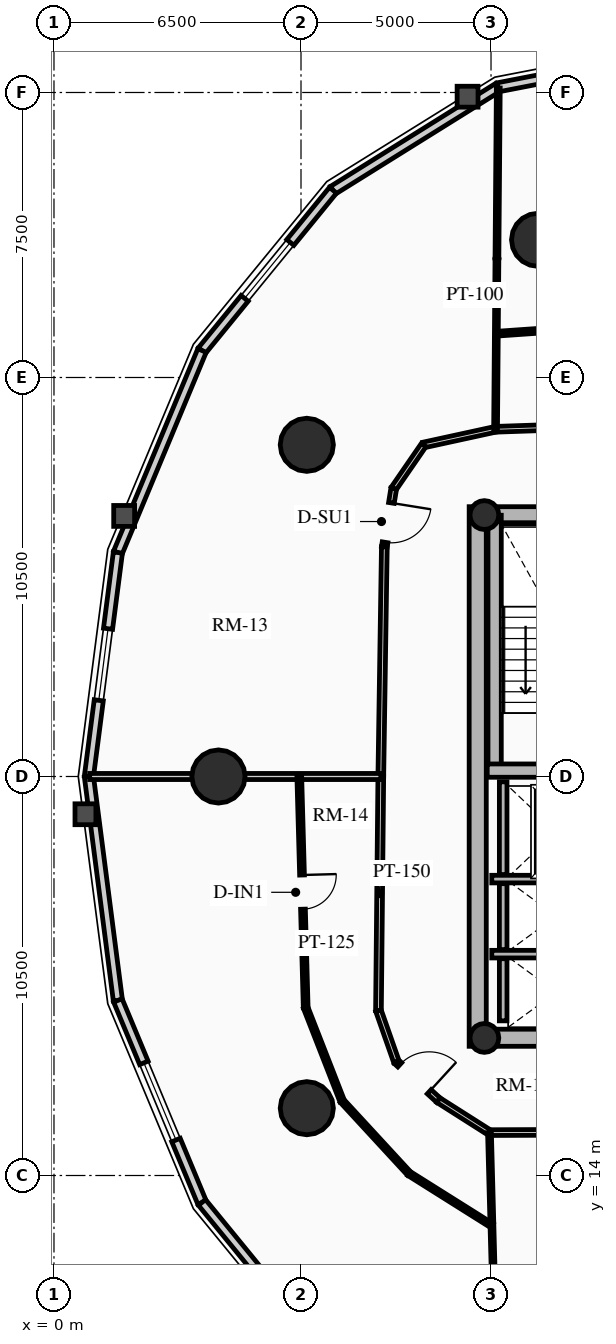
"""IFC4 building model, lengths in metres.
Left out: names, types, materials, properties, quantities, classifications, styles, units other than length and angle.
Written with IfcOpenShell. Run it as: python <this file> out.ifc"""

import sys

from ifc_helpers import new_model, si_unit, direction, frame, frame_2d, origin, origin_2d, place, context, subcontext, project, spatial, rectangle, circle, hollow_circle, extrude, source, transform, mapped, element, fill, save


model = new_model("IFC4")
c1 = context("Model", 3, precision=1e-05, world=origin(), true_north=direction((0.0, 1.0)))
c2 = subcontext(c1, "Body", "Model", "MODEL_VIEW")
j1 = project(units=[si_unit("LENGTHUNIT", "METRE"), si_unit("PLANEANGLEUNIT", "RADIAN")], contexts=[c1])
p1 = place(None, origin())
s1 = spatial("IfcSite", under=j1, at=p1, CompositionType="ELEMENT")
p2 = place(p1, origin())
s2 = spatial("IfcBuilding", under=s1, at=p2, CompositionType="ELEMENT")
p3 = place(p2, frame((0.0, 0.0, 125.44)))
s3 = spatial("IfcBuildingStorey", under=s2, at=p3, CompositionType="ELEMENT", Elevation=125.44)
p4 = place(p3, frame((11.15, 17.4, 0.0), z_axis=(0.0, 0.0, 1.0), x_axis=(0.0, 1.0, 0.0)))
e1 = element("IfcWall", 1, at=p4, inside=s3, PredefinedType="SHEAR", context=c2, shape_type="SweptSolid", body=[
    extrude(rectangle(XDim=14.2, YDim=0.45, at=frame_2d((7.1, 0.0))), origin(), (0.0, 0.0, 1.0), 3.72),
])
p5 = place(p3, frame((11.15, 17.625, 0.0), z_axis=(0.0, 0.0, 1.0), x_axis=(1.0, 0.0, 0.0)))
e2 = element("IfcWall", 2, at=p5, inside=s3, PredefinedType="SHEAR", context=c2, shape_type="SweptSolid", body=[
    extrude(rectangle(XDim=10.7, YDim=0.45, at=frame_2d((5.35, 0.0))), origin(), (0.0, 0.0, 1.0), 3.72),
])
m1 = source(origin(), c2, "Body", "SweptSolid", [
    extrude(rectangle(XDim=1.5, YDim=2.02, at=frame_2d((0.75, 1.01))), frame((0.0, 0.235, 0.0), z_axis=(0.0, -1.0, 0.0), x_axis=(1.0, 0.0, 0.0)), (0.0, 0.0, 1.0), 0.47),
])
p6 = place(p5, frame((5.45, 0.0, 0.0)))
e3 = element("IfcOpeningElement", 3, at=p6, cuts=e2, PredefinedType="OPENING", context=c2, shape_type="MappedRepresentation", body=[
    mapped(m1, transform((0.0, 0.0, 0.0), x_axis=(1.0, 0.0, 0.0), y_axis=(0.0, 1.0, 0.0), z_axis=(0.0, 0.0, 1.0), scale=1.0)),
])
p7 = place(p3, frame((11.15, 31.375, 0.0), z_axis=(0.0, 0.0, 1.0), x_axis=(1.0, 0.0, 0.0)))
e4 = element("IfcWall", 4, at=p7, inside=s3, PredefinedType="SHEAR", context=c2, shape_type="SweptSolid", body=[
    extrude(rectangle(XDim=10.7, YDim=0.45, at=frame_2d((5.35, 0.0))), origin(), (0.0, 0.0, 1.0), 3.72),
])
p8 = place(p7, frame((4.6, 0.0, 0.0)))
e5 = element("IfcOpeningElement", 5, at=p8, cuts=e4, PredefinedType="OPENING", context=c2, shape_type="MappedRepresentation", body=[
    mapped(m1, transform((0.0, 0.0, 0.0), x_axis=(1.0, 0.0, 0.0), y_axis=(0.0, 1.0, 0.0), z_axis=(0.0, 0.0, 1.0), scale=1.0)),
])
p9 = place(p3, frame((11.595, 24.655, 0.0), z_axis=(0.0, 0.0, 1.0), x_axis=(0.0, 1.0, 0.0)))
e6 = element("IfcWall", 6, at=p9, inside=s3, PredefinedType="SHEAR", context=c2, shape_type="SweptSolid", body=[
    extrude(rectangle(XDim=6.72, YDim=0.35, at=frame_2d((3.36, 0.0))), origin(), (0.0, 0.0, 1.0), 3.72),
])
p10 = place(p3, frame((11.4, 24.655, 0.0), z_axis=(0.0, 0.0, 1.0), x_axis=(1.0, 0.0, 0.0)))
e7 = element("IfcWall", 7, at=p10, inside=s3, PredefinedType="SHEAR", context=c2, shape_type="SweptSolid", body=[
    extrude(rectangle(XDim=3.285, YDim=0.35, at=frame_2d((1.643, 0.0))), origin(), (0.0, 0.0, 1.0), 3.72),
])
for number, where, z_axis, x_axis in (
    (8, (11.325, 17.62, 0.0), (0.0, 0.0, 1.0), (1.0, 0.0, 0.0)),
    (9, (11.325, 31.38, 0.0), (0.0, 0.0, 1.0), (1.0, 0.0, 0.0)),
):
    element("IfcColumn", number, at=place(p3, frame(where, z_axis=z_axis, x_axis=x_axis)), inside=s3, PredefinedType="COLUMN", context=c2, shape_type="SweptSolid", body=[
        extrude(hollow_circle(Radius=0.38, WallThickness=0.032, at=origin_2d()), origin(), (0.0, 0.0, 1.0), 3.72),
    ])
for number, where, z_axis, x_axis in (
    (10, (12.739, 38.623, 0.0), (0.0, 0.0, 1.0), (1.0, 0.0, 0.0)),
    (11, (6.653, 33.229, 0.0), (0.0, 0.0, 1.0), (1.0, 0.0, 0.0)),
    (12, (4.328, 24.5, 0.0), (0.0, 0.0, 1.0), (1.0, 0.0, 0.0)),
    (13, (6.653, 15.771, 0.0), (0.0, 0.0, 1.0), (1.0, 0.0, 0.0)),
):
    element("IfcColumn", number, at=place(p3, frame(where, z_axis=z_axis, x_axis=x_axis)), inside=s3, PredefinedType="USERDEFINED", context=c2, shape_type="SweptSolid", body=[
        extrude(circle(Radius=0.7, at=origin_2d()), origin(), (0.0, 0.0, 1.0), 3.72),
    ])
p11 = place(p3, frame((11.685, 42.637, 0.0), z_axis=(0.0, 0.0, 1.0), x_axis=(0.981723785992, 0.190311344954, 0.0)))
e14 = element("IfcWall", 14, at=p11, inside=s3, PredefinedType="SOLIDWALL", context=c2, shape_type="SweptSolid", body=[
    extrude(rectangle(XDim=4.904, YDim=0.24, at=frame_2d((2.452, 0.0))), origin(), (0.0, 0.0, 1.0), 2.949),
])
m2 = source(origin(), c2, "Body", "SweptSolid", [
    extrude(rectangle(XDim=2.2, YDim=1.35, at=frame_2d((1.1, 0.675))), frame((0.0, 0.13, 0.0), z_axis=(0.0, -1.0, 0.0), x_axis=(1.0, 0.0, 0.0)), (0.0, 0.0, 1.0), 0.26),
])
p12 = place(p11, frame((1.352, 0.0, 0.65)))
e15 = element("IfcOpeningElement", 15, at=p12, cuts=e14, PredefinedType="OPENING", context=c2, shape_type="MappedRepresentation", body=[
    mapped(m2, transform((0.0, 0.0, 0.0), x_axis=(1.0, 0.0, 0.0), y_axis=(0.0, 1.0, 0.0), z_axis=(0.0, 0.0, 1.0), scale=1.0)),
])
p13 = place(p3, frame((7.342, 39.928, 0.0), z_axis=(0.0, 0.0, 1.0), x_axis=(0.848520380187, 0.529162701263, 0.0)))
e16 = element("IfcWall", 16, at=p13, inside=s3, PredefinedType="SOLIDWALL", context=c2, shape_type="SweptSolid", body=[
    extrude(rectangle(XDim=5.119, YDim=0.24, at=frame_2d((2.56, 0.0))), origin(), (0.0, 0.0, 1.0), 2.949),
])
p14 = place(p3, frame((3.895, 35.709, 0.0), z_axis=(0.0, 0.0, 1.0), x_axis=(0.632700781152, 0.77439635945, 0.0)))
e17 = element("IfcWall", 17, at=p14, inside=s3, PredefinedType="SOLIDWALL", context=c2, shape_type="SweptSolid", body=[
    extrude(rectangle(XDim=5.448, YDim=0.24, at=frame_2d((2.724, 0.0))), origin(), (0.0, 0.0, 1.0), 2.949),
])
m3 = source(origin(), c2, "Body", "SweptSolid", [
    extrude(rectangle(XDim=1.9, YDim=1.35, at=frame_2d((0.95, 0.675))), frame((0.0, 0.13, 0.0), z_axis=(0.0, -1.0, 0.0), x_axis=(1.0, 0.0, 0.0)), (0.0, 0.0, 1.0), 0.26),
])
p15 = place(p14, frame((1.774, 0.0, 0.65)))
e18 = element("IfcOpeningElement", 18, at=p15, cuts=e17, PredefinedType="OPENING", context=c2, shape_type="MappedRepresentation", body=[
    mapped(m3, transform((0.0, 0.0, 0.0), x_axis=(1.0, 0.0, 0.0), y_axis=(0.0, 1.0, 0.0), z_axis=(0.0, 0.0, 1.0), scale=1.0)),
])
p16 = place(p3, frame((1.682, 30.393, 0.0), z_axis=(0.0, 0.0, 1.0), x_axis=(0.384344417632, 0.923189779317, 0.0)))
e19 = element("IfcWall", 19, at=p16, inside=s3, PredefinedType="SOLIDWALL", context=c2, shape_type="SweptSolid", body=[
    extrude(rectangle(XDim=5.758, YDim=0.24, at=frame_2d((2.879, 0.0))), origin(), (0.0, 0.0, 1.0), 2.949),
])
p17 = place(p3, frame((0.919, 24.5, 0.0), z_axis=(0.0, 0.0, 1.0), x_axis=(0.128351991996, 0.991728675672, 0.0)))
e20 = element("IfcWall", 20, at=p17, inside=s3, PredefinedType="SOLIDWALL", context=c2, shape_type="SweptSolid", body=[
    extrude(rectangle(XDim=5.942, YDim=0.24, at=frame_2d((2.971, 0.0))), origin(), (0.0, 0.0, 1.0), 2.949),
])
p18 = place(p17, frame((2.021, 0.0, 0.65)))
e21 = element("IfcOpeningElement", 21, at=p18, cuts=e20, PredefinedType="OPENING", context=c2, shape_type="MappedRepresentation", body=[
    mapped(m3, transform((0.0, 0.0, 0.0), x_axis=(1.0, 0.0, 0.0), y_axis=(0.0, 1.0, 0.0), z_axis=(0.0, 0.0, 1.0), scale=1.0)),
])
p19 = place(p3, frame((1.682, 18.607, 0.0), z_axis=(0.0, 0.0, 1.0), x_axis=(-0.128351991996, 0.991728675672, 0.0)))
e22 = element("IfcWall", 22, at=p19, inside=s3, PredefinedType="SOLIDWALL", context=c2, shape_type="SweptSolid", body=[
    extrude(rectangle(XDim=5.942, YDim=0.24, at=frame_2d((2.971, 0.0))), origin(), (0.0, 0.0, 1.0), 2.949),
])
p20 = place(p3, frame((3.895, 13.291, 0.0), z_axis=(0.0, 0.0, 1.0), x_axis=(-0.384344417632, 0.923189779317, 0.0)))
e23 = element("IfcWall", 23, at=p20, inside=s3, PredefinedType="SOLIDWALL", context=c2, shape_type="SweptSolid", body=[
    extrude(rectangle(XDim=5.758, YDim=0.24, at=frame_2d((2.879, 0.0))), origin(), (0.0, 0.0, 1.0), 2.949),
])
p21 = place(p20, frame((1.779, 0.0, 0.65)))
e24 = element("IfcOpeningElement", 24, at=p21, cuts=e23, PredefinedType="OPENING", context=c2, shape_type="MappedRepresentation", body=[
    mapped(m2, transform((0.0, 0.0, 0.0), x_axis=(1.0, 0.0, 0.0), y_axis=(0.0, 1.0, 0.0), z_axis=(0.0, 0.0, 1.0), scale=1.0)),
])
p22 = place(p3, frame((7.342, 9.072, 0.0), z_axis=(0.0, 0.0, 1.0), x_axis=(-0.632700781152, 0.77439635945, 0.0)))
e25 = element("IfcWall", 25, at=p22, inside=s3, PredefinedType="SOLIDWALL", context=c2, shape_type="SweptSolid", body=[
    extrude(rectangle(XDim=5.448, YDim=0.24, at=frame_2d((2.724, 0.0))), origin(), (0.0, 0.0, 1.0), 2.949),
])
p23 = place(p3, frame((11.52, 21.8, 0.0), z_axis=(0.0, 0.0, 1.0), x_axis=(1.0, 0.0, 0.0)))
e26 = element("IfcWall", 26, at=p23, inside=s3, PredefinedType="SHEAR", context=c2, shape_type="SweptSolid", body=[
    extrude(rectangle(XDim=2.97, YDim=0.2, at=frame_2d((1.485, 0.0))), origin(), (0.0, 0.0, 1.0), 3.72),
])
p24 = place(p3, frame((11.82, 21.92, 0.0), z_axis=(0.0, 0.0, 1.0), x_axis=(0.0, 1.0, 0.0)))
e27 = element("IfcWall", 27, at=p24, inside=s3, PredefinedType="SHEAR", context=c2, shape_type="SweptSolid", body=[
    extrude(rectangle(XDim=2.44, YDim=0.2, at=frame_2d((1.22, 0.0))), origin(), (0.0, 0.0, 1.0), 3.72),
])
p25 = place(p3, frame((11.52, 19.825, 0.0), z_axis=(0.0, 0.0, 1.0), x_axis=(1.0, 0.0, 0.0)))
e28 = element("IfcWall", 28, at=p25, inside=s3, PredefinedType="SHEAR", context=c2, shape_type="SweptSolid", body=[
    extrude(rectangle(XDim=2.97, YDim=0.2, at=frame_2d((1.485, 0.0))), origin(), (0.0, 0.0, 1.0), 3.72),
])
p26 = place(p3, frame((11.82, 19.945, 0.0), z_axis=(0.0, 0.0, 1.0), x_axis=(0.0, 1.0, 0.0)))
e29 = element("IfcWall", 29, at=p26, inside=s3, PredefinedType="SHEAR", context=c2, shape_type="SweptSolid", body=[
    extrude(rectangle(XDim=1.735, YDim=0.2, at=frame_2d((0.867, 0.0))), origin(), (0.0, 0.0, 1.0), 3.72),
])
p27 = place(p3, frame((11.82, 18.07, 0.0), z_axis=(0.0, 0.0, 1.0), x_axis=(0.0, 1.0, 0.0)))
e30 = element("IfcWall", 30, at=p27, inside=s3, PredefinedType="SHEAR", context=c2, shape_type="SweptSolid", body=[
    extrude(rectangle(XDim=1.635, YDim=0.2, at=frame_2d((0.817, 0.0))), origin(), (0.0, 0.0, 1.0), 3.72),
])
p28 = place(p3, frame((18.143, 33.86, 0.0), z_axis=(0.0, 0.0, 1.0), x_axis=(-0.999419208319, -0.034077060363, 0.0)))
e31 = element("IfcWall", 31, at=p28, inside=s3, PredefinedType="PARTITIONING", context=c2, shape_type="SweptSolid", body=[
    extrude(rectangle(XDim=6.527, YDim=0.15, at=frame_2d((3.263, 0.0))), origin(), (0.0, 0.0, 1.0), 2.995),
])
p29 = place(p3, frame((11.62, 33.637, 0.0), z_axis=(0.0, 0.0, 1.0), x_axis=(-0.97702579435, -0.213121085711, 0.0)))
e32 = element("IfcWall", 32, at=p29, inside=s3, PredefinedType="PARTITIONING", context=c2, shape_type="SweptSolid", body=[
    extrude(rectangle(XDim=1.935, YDim=0.15, at=frame_2d((0.967, 0.0))), origin(), (0.0, 0.0, 1.0), 2.995),
])
p30 = place(p3, frame((9.729, 33.225, 0.0), z_axis=(0.0, 0.0, 1.0), x_axis=(-0.567183649484, -0.82359134755, 0.0)))
e33 = element("IfcWall", 33, at=p30, inside=s3, PredefinedType="PARTITIONING", context=c2, shape_type="SweptSolid", body=[
    extrude(rectangle(XDim=1.392, YDim=0.15, at=frame_2d((0.696, 0.0))), origin(), (0.0, 0.0, 1.0), 2.995),
])
p31 = place(p3, frame((8.94, 32.078, 0.0), z_axis=(0.0, 0.0, 1.0), x_axis=(-0.159148467753, -0.98725466077, 0.0)))
e34 = element("IfcWall", 34, at=p31, inside=s3, PredefinedType="PARTITIONING", context=c2, shape_type="SweptSolid", body=[
    extrude(rectangle(XDim=1.554, YDim=0.15, at=frame_2d((0.777, 0.0))), origin(), (0.0, 0.0, 1.0), 2.995),
])
m4 = source(origin(), c2, "Body", "SweptSolid", [
    extrude(rectangle(XDim=1.05, YDim=2.015, at=frame_2d((0.525, 1.007))), frame((0.0, 0.085, 0.0), z_axis=(0.0, -1.0, 0.0), x_axis=(1.0, 0.0, 0.0)), (0.0, 0.0, 1.0), 0.17),
])
p32 = place(p31, frame((0.384, 0.0, 0.0)))
e35 = element("IfcOpeningElement", 35, at=p32, cuts=e34, PredefinedType="OPENING", context=c2, shape_type="MappedRepresentation", body=[
    mapped(m4, transform((0.0, 0.0, 0.0), x_axis=(1.0, 0.0, 0.0), y_axis=(0.0, 1.0, 0.0), z_axis=(0.0, 0.0, 1.0), scale=1.0)),
])
p33 = place(p3, frame((8.693, 30.544, 0.0), z_axis=(0.0, 0.0, 1.0), x_axis=(-0.015307007986, -0.99988284089, 0.0)))
e36 = element("IfcWall", 36, at=p33, inside=s3, PredefinedType="PARTITIONING", context=c2, shape_type="SweptSolid", body=[
    extrude(rectangle(XDim=6.045, YDim=0.15, at=frame_2d((3.022, 0.0))), origin(), (0.0, 0.0, 1.0), 3.425),
])
p34 = place(p3, frame((8.6, 24.5, 0.0), z_axis=(0.0, 0.0, 1.0), x_axis=(-0.010023665349, -0.999949761805, 0.0)))
e37 = element("IfcWall", 37, at=p34, inside=s3, PredefinedType="PARTITIONING", context=c2, shape_type="SweptSolid", body=[
    extrude(rectangle(XDim=6.162, YDim=0.15, at=frame_2d((3.081, 0.0))), origin(), (0.0, 0.0, 1.0), 2.995),
])
p35 = place(p3, frame((8.538, 18.338, 0.0), z_axis=(0.0, 0.0, 1.0), x_axis=(0.331358150167, -0.94350504838, 0.0)))
e38 = element("IfcWall", 38, at=p35, inside=s3, PredefinedType="PARTITIONING", context=c2, shape_type="SweptSolid", body=[
    extrude(rectangle(XDim=1.424, YDim=0.15, at=frame_2d((0.712, 0.0))), origin(), (0.0, 0.0, 1.0), 2.995),
])
p36 = place(p3, frame((9.01, 16.994, 0.0), z_axis=(0.0, 0.0, 1.0), x_axis=(0.737701798986, -0.67512669609, 0.0)))
e39 = element("IfcWall", 39, at=p36, inside=s3, PredefinedType="PARTITIONING", context=c2, shape_type="SweptSolid", body=[
    extrude(rectangle(XDim=1.498, YDim=0.15, at=frame_2d((0.749, 0.0))), origin(), (0.0, 0.0, 1.0), 2.995),
])
p37 = place(p36, frame((0.12, 0.0, 0.0)))
e40 = element("IfcOpeningElement", 40, at=p37, cuts=e39, PredefinedType="OPENING", context=c2, shape_type="MappedRepresentation", body=[
    mapped(m4, transform((0.0, 0.0, 0.0), x_axis=(1.0, 0.0, 0.0), y_axis=(0.0, 1.0, 0.0), z_axis=(0.0, 0.0, 1.0), scale=1.0)),
])
p38 = place(p3, frame((10.115, 15.983, 0.0), z_axis=(0.0, 0.0, 1.0), x_axis=(0.843995849351, -0.536349705209, 0.0)))
e41 = element("IfcWall", 41, at=p38, inside=s3, PredefinedType="PARTITIONING", context=c2, shape_type="SweptSolid", body=[
    extrude(rectangle(XDim=1.593, YDim=0.15, at=frame_2d((0.796, 0.0))), origin(), (0.0, 0.0, 1.0), 2.995),
])
p39 = place(p3, frame((11.46, 15.129, 0.0), z_axis=(0.0, 0.0, 1.0), x_axis=(0.999993513287, 0.003601858435, 0.0)))
e42 = element("IfcWall", 42, at=p39, inside=s3, PredefinedType="PARTITIONING", context=c2, shape_type="SweptSolid", body=[
    extrude(rectangle(XDim=3.321, YDim=0.15, at=frame_2d((1.661, 0.0))), origin(), (0.0, 0.0, 1.0), 2.995),
])
p40 = place(p3, frame((11.62, 33.637, 0.0), z_axis=(0.0, 0.0, 1.0), x_axis=(0.007965167065, 0.999968277554, 0.0)))
e43 = element("IfcWall", 43, at=p40, inside=s3, PredefinedType="MOVABLE", context=c2, shape_type="SweptSolid", body=[
    extrude(rectangle(XDim=8.981, YDim=0.1, at=frame_2d((4.49, 0.0))), origin(), (0.0, 0.0, 1.0), 2.949),
])
p41 = place(p3, frame((8.6, 24.5, 0.0), z_axis=(0.0, 0.0, 1.0), x_axis=(-1.0, 0.0, 0.0)))
e44 = element("IfcWall", 44, at=p41, inside=s3, PredefinedType="PARTITIONING", context=c2, shape_type="SweptSolid", body=[
    extrude(rectangle(XDim=7.661, YDim=0.16, at=frame_2d((3.831, 0.0))), origin(), (0.0, 0.0, 1.0), 2.949),
])
p42 = place(p3, frame((11.46, 15.129, 0.0), z_axis=(0.0, 0.0, 1.0), x_axis=(0.026480592098, -0.999649327636, 0.0)))
e45 = element("IfcWall", 45, at=p42, inside=s3, PredefinedType="MOVABLE", context=c2, shape_type="SweptSolid", body=[
    extrude(rectangle(XDim=8.75, YDim=0.1, at=frame_2d((4.375, 0.0))), origin(), (0.0, 0.0, 1.0), 2.949),
])
p43 = place(p3, frame((17.683, 36.573, 0.0), z_axis=(0.0, 0.0, 1.0), x_axis=(-0.997580369038, -0.069522710754, 0.0)))
e46 = element("IfcWall", 46, at=p43, inside=s3, PredefinedType="PARTITIONING", context=c2, shape_type="SweptSolid", body=[
    extrude(rectangle(XDim=6.058, YDim=0.125, at=frame_2d((3.029, 0.0))), origin(), (0.0, 0.0, 1.0), 2.995),
])
p44 = place(p3, frame((6.455, 24.5, 0.0), z_axis=(0.0, 0.0, 1.0), x_axis=(0.027753708707, -0.999614791634, 0.0)))
e47 = element("IfcWall", 47, at=p44, inside=s3, PredefinedType="PARTITIONING", context=c2, shape_type="SweptSolid", body=[
    extrude(rectangle(XDim=6.087, YDim=0.125, at=frame_2d((3.044, 0.0))), origin(), (0.0, 0.0, 1.0), 2.995),
])
m5 = source(origin(), c2, "Body", "SweptSolid", [
    extrude(rectangle(XDim=0.9, YDim=2.005, at=frame_2d((0.45, 1.002))), frame((0.0, 0.073, 0.0), z_axis=(0.0, -1.0, 0.0), x_axis=(1.0, 0.0, 0.0)), (0.0, 0.0, 1.0), 0.145),
])
p45 = place(p44, frame((2.594, 0.0, 0.0)))
e48 = element("IfcOpeningElement", 48, at=p45, cuts=e47, PredefinedType="OPENING", context=c2, shape_type="MappedRepresentation", body=[
    mapped(m5, transform((0.0, 0.0, 0.0), x_axis=(1.0, 0.0, 0.0), y_axis=(0.0, 1.0, 0.0), z_axis=(0.0, 0.0, 1.0), scale=1.0)),
])
p46 = place(p3, frame((6.624, 18.415, 0.0), z_axis=(0.0, 0.0, 1.0), x_axis=(0.363854295337, -0.931455877519, 0.0)))
e49 = element("IfcWall", 49, at=p46, inside=s3, PredefinedType="PARTITIONING", context=c2, shape_type="SweptSolid", body=[
    extrude(rectangle(XDim=2.635, YDim=0.125, at=frame_2d((1.317, 0.0))), origin(), (0.0, 0.0, 1.0), 2.995),
])
p47 = place(p3, frame((7.583, 15.961, 0.0), z_axis=(0.0, 0.0, 1.0), x_axis=(0.677838563189, -0.735210774032, 0.0)))
e50 = element("IfcWall", 50, at=p47, inside=s3, PredefinedType="PARTITIONING", context=c2, shape_type="SweptSolid", body=[
    extrude(rectangle(XDim=2.596, YDim=0.125, at=frame_2d((1.298, 0.0))), origin(), (0.0, 0.0, 1.0), 3.425),
])
p48 = place(p3, frame((9.342, 14.052, 0.0), z_axis=(0.0, 0.0, 1.0), x_axis=(0.846526826244, -0.532346064557, 0.0)))
e51 = element("IfcWall", 51, at=p48, inside=s3, PredefinedType="PARTITIONING", context=c2, shape_type="SweptSolid", body=[
    extrude(rectangle(XDim=2.578, YDim=0.125, at=frame_2d((1.289, 0.0))), origin(), (0.0, 0.0, 1.0), 2.995),
])
m6 = source(origin(), c2, "Body", "SweptSolid", [
    extrude(rectangle(XDim=1.9, YDim=1.35, at=frame_2d((0.95, 0.675))), frame((0.0, 0.03, 0.0), z_axis=(0.0, -1.0, 0.0), x_axis=(1.0, 0.0, 0.0)), (0.0, 0.0, 1.0), 0.06),
])
p49 = place(p15, origin())
e52 = element("IfcWindow", 52, at=p49, inside=s3, PartitioningType="DOUBLE_PANEL_VERTICAL", PredefinedType="WINDOW", context=c2, shape_type="MappedRepresentation", body=[
    mapped(m6, transform((0.0, 0.0, 0.0), x_axis=(1.0, 0.0, 0.0), y_axis=(0.0, 1.0, 0.0), z_axis=(0.0, 0.0, 1.0), scale=1.0)),
])
fill(e18, e52)
p50 = place(p18, origin())
e53 = element("IfcWindow", 53, at=p50, inside=s3, PartitioningType="DOUBLE_PANEL_VERTICAL", PredefinedType="WINDOW", context=c2, shape_type="MappedRepresentation", body=[
    mapped(m6, transform((0.0, 0.0, 0.0), x_axis=(1.0, 0.0, 0.0), y_axis=(0.0, 1.0, 0.0), z_axis=(0.0, 0.0, 1.0), scale=1.0)),
])
fill(e21, e53)
m7 = source(origin(), c2, "Body", "SweptSolid", [
    extrude(rectangle(XDim=2.2, YDim=1.35, at=frame_2d((1.1, 0.675))), frame((0.0, 0.03, 0.0), z_axis=(0.0, -1.0, 0.0), x_axis=(1.0, 0.0, 0.0)), (0.0, 0.0, 1.0), 0.06),
])
p51 = place(p21, origin())
e54 = element("IfcWindow", 54, at=p51, inside=s3, PartitioningType="DOUBLE_PANEL_VERTICAL", PredefinedType="WINDOW", context=c2, shape_type="MappedRepresentation", body=[
    mapped(m7, transform((0.0, 0.0, 0.0), x_axis=(1.0, 0.0, 0.0), y_axis=(0.0, 1.0, 0.0), z_axis=(0.0, 0.0, 1.0), scale=1.0)),
])
fill(e24, e54)
m8 = source(origin(), c2, "Body", "SweptSolid", [
    extrude(rectangle(XDim=1.05, YDim=2.015, at=frame_2d((0.525, 1.007))), frame((0.0, 0.025, 0.0), z_axis=(0.0, -1.0, 0.0), x_axis=(1.0, 0.0, 0.0)), (0.0, 0.0, 1.0), 0.05),
])
p52 = place(p32, origin())
e55 = element("IfcDoor", 55, at=p52, inside=s3, OperationType="SINGLE_SWING_LEFT", PredefinedType="DOOR", context=c2, shape_type="MappedRepresentation", body=[
    mapped(m8, transform((0.0, 0.0, 0.0), x_axis=(1.0, 0.0, 0.0), y_axis=(0.0, 1.0, 0.0), z_axis=(0.0, 0.0, 1.0), scale=1.0)),
])
fill(e35, e55)
p53 = place(p37, origin())
e56 = element("IfcDoor", 56, at=p53, inside=s3, OperationType="SINGLE_SWING_RIGHT", PredefinedType="DOOR", context=c2, shape_type="MappedRepresentation", body=[
    mapped(m8, transform((0.0, 0.0, 0.0), x_axis=(1.0, 0.0, 0.0), y_axis=(0.0, 1.0, 0.0), z_axis=(0.0, 0.0, 1.0), scale=1.0)),
])
fill(e40, e56)
m9 = source(origin(), c2, "Body", "SweptSolid", [
    extrude(rectangle(XDim=0.9, YDim=2.005, at=frame_2d((0.45, 1.002))), frame((0.0, 0.025, 0.0), z_axis=(0.0, -1.0, 0.0), x_axis=(1.0, 0.0, 0.0)), (0.0, 0.0, 1.0), 0.05),
])
p54 = place(p45, origin())
e57 = element("IfcDoor", 57, at=p54, inside=s3, OperationType="SINGLE_SWING_LEFT", PredefinedType="DOOR", context=c2, shape_type="MappedRepresentation", body=[
    mapped(m9, transform((0.0, 0.0, 0.0), x_axis=(1.0, 0.0, 0.0), y_axis=(0.0, 1.0, 0.0), z_axis=(0.0, 0.0, 1.0), scale=1.0)),
])
fill(e48, e57)
save(model, sys.argv[1])
